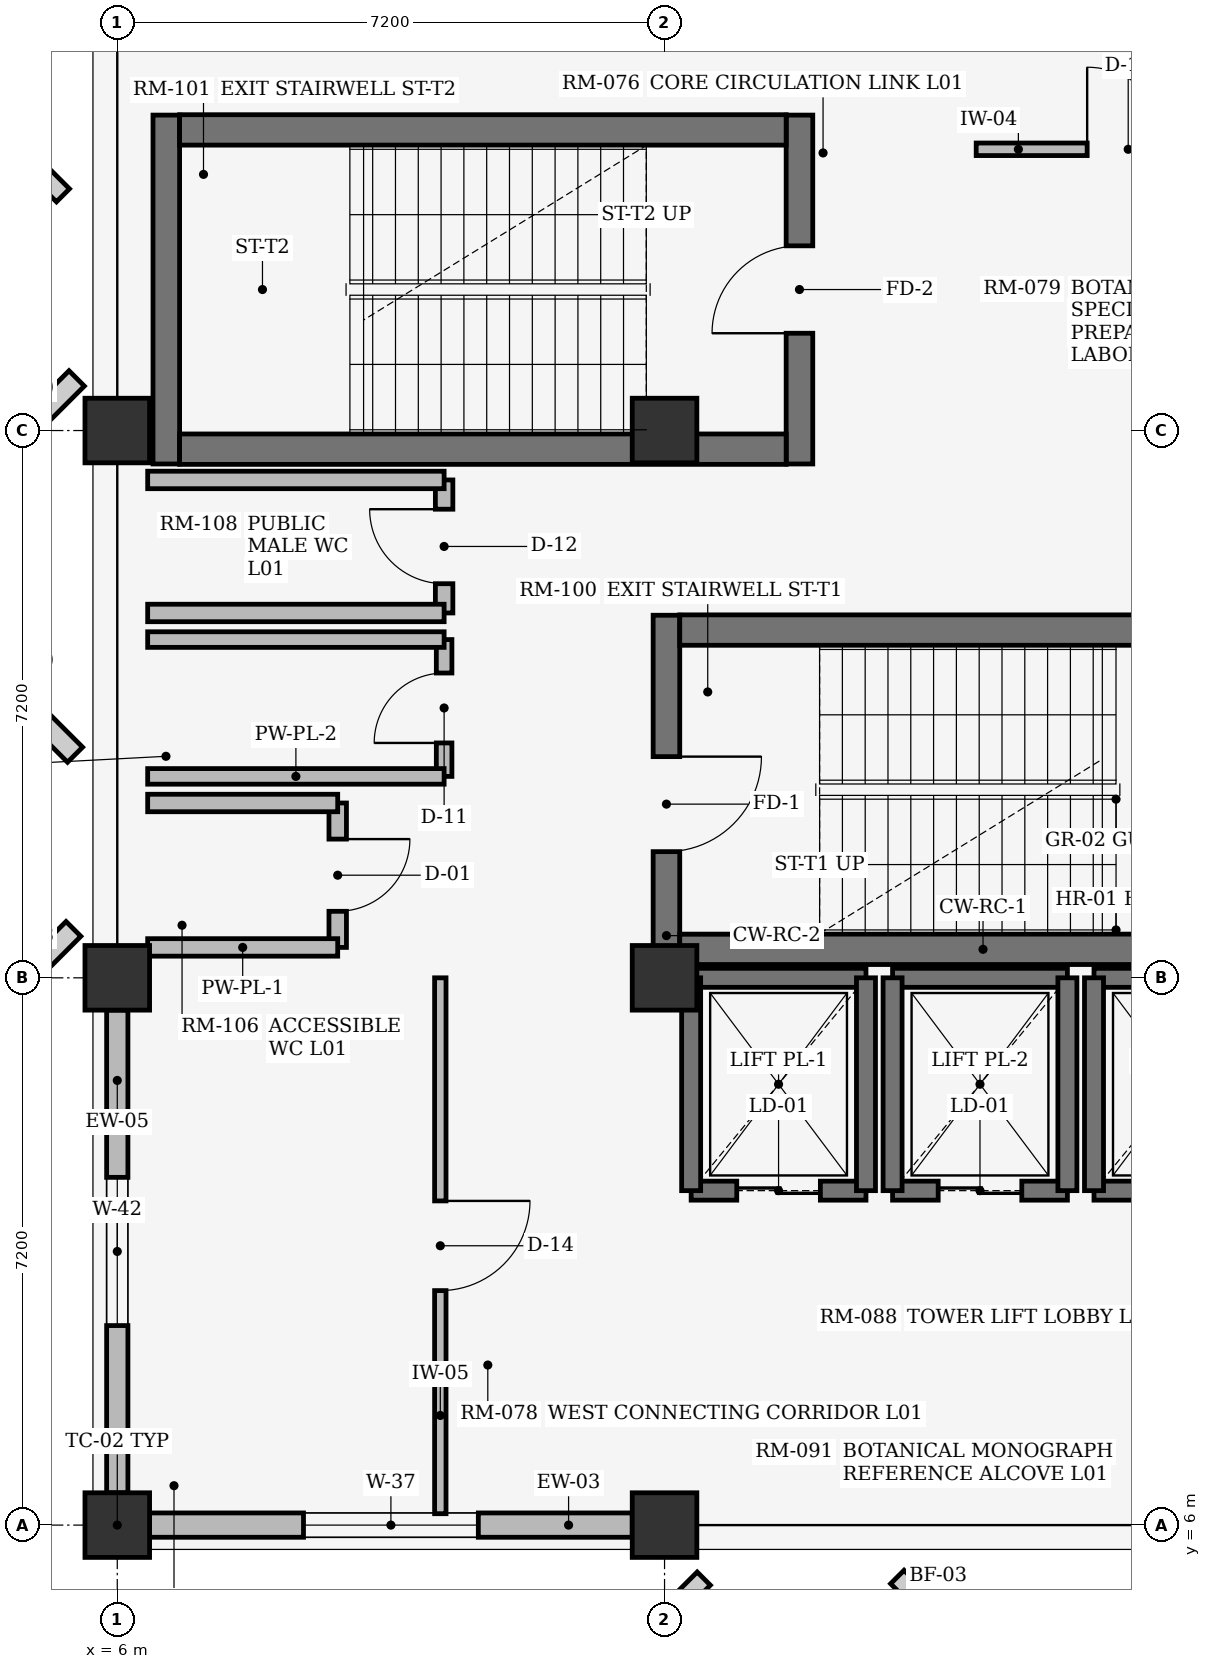
"""IFC4 building model, lengths in metres.
Left out: names, types, materials, properties, quantities, classifications, styles, units other than length and angle.
Written with IfcOpenShell. Run it as: python <this file> out.ifc"""

import sys

from ifc_helpers import new_model, si_unit, direction, frame, frame_2d, origin, origin_2d, place, context, subcontext, project, spatial, rectangle, extrude, element, fill, save


model = new_model("IFC4")
c1 = context("Model", 3, precision=1e-05, world=origin(), true_north=direction((0.0, 1.0)))
c2 = subcontext(c1, "Body", "Model", "MODEL_VIEW")
j1 = project(units=[si_unit("LENGTHUNIT", "METRE"), si_unit("PLANEANGLEUNIT", "RADIAN")], contexts=[c1])
p1 = place(None, origin())
s1 = spatial("IfcSite", under=j1, at=p1, CompositionType="ELEMENT")
p2 = place(p1, origin())
s2 = spatial("IfcBuilding", under=s1, at=p2, CompositionType="ELEMENT")
p3 = place(p2, frame((0.0, 0.0, 4.8)))
s3 = spatial("IfcBuildingStorey", under=s2, at=p3, CompositionType="ELEMENT", Elevation=4.8)
for number, where, z_axis, x_axis in (
    (1, (6.0, 6.0, 0.0), (0.0, 0.0, 1.0), (1.0, 0.0, 0.0)),
    (2, (6.0, 13.2, 0.0), (0.0, 0.0, 1.0), (1.0, 0.0, 0.0)),
    (3, (6.0, 20.4, 0.0), (0.0, 0.0, 1.0), (1.0, 0.0, 0.0)),
    (4, (13.2, 6.0, 0.0), (0.0, 0.0, 1.0), (1.0, 0.0, 0.0)),
    (5, (13.2, 13.2, 0.0), (0.0, 0.0, 1.0), (1.0, 0.0, 0.0)),
    (6, (13.2, 20.4, 0.0), (0.0, 0.0, 1.0), (1.0, 0.0, 0.0)),
):
    element("IfcColumn", number, at=place(p3, frame(where, z_axis=z_axis, x_axis=x_axis)), inside=s3, PredefinedType="COLUMN", context=c2, shape_type="SweptSolid", body=[
        extrude(rectangle(XDim=0.85, YDim=0.85, at=origin_2d()), origin(), (0.0, 0.0, 1.0), 3.95),
    ])
p4 = place(p3, frame((6.425, 6.0, 0.0), z_axis=(0.0, 0.0, 1.0), x_axis=(1.0, 0.0, 0.0)))
e7 = element("IfcWall", 7, at=p4, inside=s3, PredefinedType="STANDARD", context=c2, shape_type="SweptSolid", body=[
    extrude(rectangle(XDim=6.35, YDim=0.32, at=frame_2d((3.175, 0.0))), origin(), (0.0, 0.0, 1.0), 3.33),
])
p5 = place(p4, frame((2.025, 0.0, 0.75)))
e8 = element("IfcOpeningElement", 8, at=p5, cuts=e7, PredefinedType="OPENING", context=c2, shape_type="SweptSolid", body=[
    extrude(rectangle(XDim=2.3, YDim=1.35, at=frame_2d((1.15, 0.675))), frame((0.0, 0.17, 0.0), z_axis=(0.0, -1.0, 0.0), x_axis=(1.0, 0.0, 0.0)), (0.0, 0.0, 1.0), 0.34),
])
p6 = place(p3, frame((6.0, 6.425, 0.0), z_axis=(0.0, 0.0, 1.0), x_axis=(0.0, 1.0, 0.0)))
e9 = element("IfcWall", 9, at=p6, inside=s3, PredefinedType="STANDARD", context=c2, shape_type="SweptSolid", body=[
    extrude(rectangle(XDim=6.35, YDim=0.28, at=frame_2d((3.175, 0.0))), origin(), (0.0, 0.0, 1.0), 3.33),
])
p7 = place(p6, frame((2.2, 0.0, 0.75)))
e10 = element("IfcOpeningElement", 10, at=p7, cuts=e9, PredefinedType="OPENING", context=c2, shape_type="SweptSolid", body=[
    extrude(rectangle(XDim=1.95, YDim=1.5, at=frame_2d((0.975, 0.75))), frame((0.0, 0.15, 0.0), z_axis=(0.0, -1.0, 0.0), x_axis=(1.0, 0.0, 0.0)), (0.0, 0.0, 1.0), 0.3),
])
p8 = place(p3, frame((13.225, 13.0, 0.0), z_axis=(0.0, 0.0, 1.0), x_axis=(0.0, 1.0, 0.0)))
e11 = element("IfcWall", 11, at=p8, inside=s3, PredefinedType="SHEAR", context=c2, shape_type="SweptSolid", body=[
    extrude(rectangle(XDim=4.97, YDim=0.35, at=frame_2d((2.485, 0.0))), origin(), (0.0, 0.0, 1.0), 3.95),
])
p9 = place(p8, frame((1.86, 0.0, 0.0)))
e12 = element("IfcOpeningElement", 12, at=p9, cuts=e11, PredefinedType="OPENING", context=c2, shape_type="SweptSolid", body=[
    extrude(rectangle(XDim=1.25, YDim=2.2, at=frame_2d((0.625, 1.1))), frame((0.0, 0.185, 0.0), z_axis=(0.0, -1.0, 0.0), x_axis=(1.0, 0.0, 0.0)), (0.0, 0.0, 1.0), 0.37),
])
for number, where, z_axis, x_axis in (
    (13, (13.4, 13.575, 0.0), (0.0, 0.0, 1.0), (1.0, 0.0, 0.0)),
    (14, (13.4, 17.775, 0.0), (0.0, 0.0, 1.0), (1.0, 0.0, 0.0)),
):
    element("IfcWall", number, at=place(p3, frame(where, z_axis=z_axis, x_axis=x_axis)), inside=s3, PredefinedType="SHEAR", context=c2, shape_type="SweptSolid", body=[
        extrude(rectangle(XDim=7.98, YDim=0.4, at=frame_2d((3.99, 0.0))), origin(), (0.0, 0.0, 1.0), 3.95),
    ])
p10 = place(p3, frame((14.975, 24.55, 0.0), z_axis=(0.0, 0.0, 1.0), x_axis=(0.0, -1.0, 0.0)))
e15 = element("IfcWall", 15, at=p10, inside=s3, PredefinedType="SHEAR", context=c2, shape_type="SweptSolid", body=[
    extrude(rectangle(XDim=4.59, YDim=0.35, at=frame_2d((2.295, 0.0))), origin(), (0.0, 0.0, 1.0), 3.95),
])
p11 = place(p10, frame((1.72, 0.0, 0.0)))
e16 = element("IfcOpeningElement", 16, at=p11, cuts=e15, PredefinedType="OPENING", context=c2, shape_type="SweptSolid", body=[
    extrude(rectangle(XDim=1.15, YDim=2.2, at=frame_2d((0.575, 1.1))), frame((0.0, 0.185, 0.0), z_axis=(0.0, -1.0, 0.0), x_axis=(1.0, 0.0, 0.0)), (0.0, 0.0, 1.0), 0.37),
])
p12 = place(p3, frame((6.645, 24.55, 0.0), z_axis=(0.0, 0.0, 1.0), x_axis=(0.0, -1.0, 0.0)))
e17 = element("IfcWall", 17, at=p12, inside=s3, PredefinedType="SHEAR", context=c2, shape_type="SweptSolid", body=[
    extrude(rectangle(XDim=4.59, YDim=0.35, at=frame_2d((2.295, 0.0))), origin(), (0.0, 0.0, 1.0), 3.95),
])
for number, where, z_axis, x_axis in (
    (18, (14.8, 24.355, 0.0), (0.0, 0.0, 1.0), (-1.0, 0.0, 0.0)),
    (19, (14.8, 20.155, 0.0), (0.0, 0.0, 1.0), (-1.0, 0.0, 0.0)),
):
    element("IfcWall", number, at=place(p3, frame(where, z_axis=z_axis, x_axis=x_axis)), inside=s3, PredefinedType="SHEAR", context=c2, shape_type="SweptSolid", body=[
        extrude(rectangle(XDim=7.98, YDim=0.4, at=frame_2d((3.99, 0.0))), origin(), (0.0, 0.0, 1.0), 3.95),
    ])
p13 = place(p3, frame((13.55, 10.4, 0.0), z_axis=(0.0, 0.0, 1.0), x_axis=(1.0, 0.0, 0.0)))
e20 = element("IfcWall", 20, at=p13, inside=s3, PredefinedType="SHEAR", context=c2, shape_type="SweptSolid", body=[
    extrude(rectangle(XDim=2.3, YDim=0.25, at=frame_2d((1.15, 0.0))), origin(), (0.0, 0.0, 1.0), 3.95),
])
p14 = place(p13, frame((0.6, 0.0, 0.0)))
e21 = element("IfcOpeningElement", 21, at=p14, cuts=e20, PredefinedType="OPENING", context=c2, shape_type="SweptSolid", body=[
    extrude(rectangle(XDim=1.1, YDim=2.2, at=frame_2d((0.55, 1.1))), frame((0.0, 0.135, 0.0), z_axis=(0.0, -1.0, 0.0), x_axis=(1.0, 0.0, 0.0)), (0.0, 0.0, 1.0), 0.27),
])
p15 = place(p3, frame((13.55, 13.2, 0.0), z_axis=(0.0, 0.0, 1.0), x_axis=(1.0, 0.0, 0.0)))
e22 = element("IfcWall", 22, at=p15, inside=s3, PredefinedType="SHEAR", context=c2, shape_type="SweptSolid", body=[
    extrude(rectangle(XDim=2.3, YDim=0.25, at=frame_2d((1.15, 0.0))), origin(), (0.0, 0.0, 1.0), 3.95),
])
for number, where, z_axis, x_axis in (
    (23, (13.55, 10.4, 0.0), (0.0, 0.0, 1.0), (0.0, 1.0, 0.0)),
    (24, (15.85, 10.4, 0.0), (0.0, 0.0, 1.0), (0.0, 1.0, 0.0)),
):
    element("IfcWall", number, at=place(p3, frame(where, z_axis=z_axis, x_axis=x_axis)), inside=s3, PredefinedType="SHEAR", context=c2, shape_type="SweptSolid", body=[
        extrude(rectangle(XDim=2.8, YDim=0.25, at=frame_2d((1.4, 0.0))), origin(), (0.0, 0.0, 1.0), 3.95),
    ])
p16 = place(p3, frame((16.2, 10.4, 0.0), z_axis=(0.0, 0.0, 1.0), x_axis=(1.0, 0.0, 0.0)))
e25 = element("IfcWall", 25, at=p16, inside=s3, PredefinedType="SHEAR", context=c2, shape_type="SweptSolid", body=[
    extrude(rectangle(XDim=2.3, YDim=0.25, at=frame_2d((1.15, 0.0))), origin(), (0.0, 0.0, 1.0), 3.95),
])
p17 = place(p16, frame((0.6, 0.0, 0.0)))
e26 = element("IfcOpeningElement", 26, at=p17, cuts=e25, PredefinedType="OPENING", context=c2, shape_type="SweptSolid", body=[
    extrude(rectangle(XDim=1.1, YDim=2.2, at=frame_2d((0.55, 1.1))), frame((0.0, 0.135, 0.0), z_axis=(0.0, -1.0, 0.0), x_axis=(1.0, 0.0, 0.0)), (0.0, 0.0, 1.0), 0.27),
])
p18 = place(p3, frame((16.2, 13.2, 0.0), z_axis=(0.0, 0.0, 1.0), x_axis=(1.0, 0.0, 0.0)))
e27 = element("IfcWall", 27, at=p18, inside=s3, PredefinedType="SHEAR", context=c2, shape_type="SweptSolid", body=[
    extrude(rectangle(XDim=2.3, YDim=0.25, at=frame_2d((1.15, 0.0))), origin(), (0.0, 0.0, 1.0), 3.95),
])
for number, where, z_axis, x_axis in (
    (28, (16.2, 10.4, 0.0), (0.0, 0.0, 1.0), (0.0, 1.0, 0.0)),
    (29, (18.5, 10.4, 0.0), (0.0, 0.0, 1.0), (0.0, 1.0, 0.0)),
):
    element("IfcWall", number, at=place(p3, frame(where, z_axis=z_axis, x_axis=x_axis)), inside=s3, PredefinedType="SHEAR", context=c2, shape_type="SweptSolid", body=[
        extrude(rectangle(XDim=2.8, YDim=0.25, at=frame_2d((1.4, 0.0))), origin(), (0.0, 0.0, 1.0), 3.95),
    ])
p19 = place(p3, frame((18.85, 10.4, 0.0), z_axis=(0.0, 0.0, 1.0), x_axis=(1.0, 0.0, 0.0)))
e30 = element("IfcWall", 30, at=p19, inside=s3, PredefinedType="SHEAR", context=c2, shape_type="SweptSolid", body=[
    extrude(rectangle(XDim=2.3, YDim=0.25, at=frame_2d((1.15, 0.0))), origin(), (0.0, 0.0, 1.0), 3.95),
])
p20 = place(p19, frame((0.6, 0.0, 0.0)))
e31 = element("IfcOpeningElement", 31, at=p20, cuts=e30, PredefinedType="OPENING", context=c2, shape_type="SweptSolid", body=[
    extrude(rectangle(XDim=1.1, YDim=2.2, at=frame_2d((0.55, 1.1))), frame((0.0, 0.135, 0.0), z_axis=(0.0, -1.0, 0.0), x_axis=(1.0, 0.0, 0.0)), (0.0, 0.0, 1.0), 0.27),
])
p21 = place(p3, frame((18.85, 13.2, 0.0), z_axis=(0.0, 0.0, 1.0), x_axis=(1.0, 0.0, 0.0)))
e32 = element("IfcWall", 32, at=p21, inside=s3, PredefinedType="SHEAR", context=c2, shape_type="SweptSolid", body=[
    extrude(rectangle(XDim=2.3, YDim=0.25, at=frame_2d((1.15, 0.0))), origin(), (0.0, 0.0, 1.0), 3.95),
])
p22 = place(p3, frame((18.85, 10.4, 0.0), z_axis=(0.0, 0.0, 1.0), x_axis=(0.0, 1.0, 0.0)))
e33 = element("IfcWall", 33, at=p22, inside=s3, PredefinedType="SHEAR", context=c2, shape_type="SweptSolid", body=[
    extrude(rectangle(XDim=2.8, YDim=0.25, at=frame_2d((1.4, 0.0))), origin(), (0.0, 0.0, 1.0), 3.95),
])
p23 = place(p3, frame((8.9, 13.6, 0.0), z_axis=(0.0, 0.0, 1.0), x_axis=(0.0, 1.0, 0.0)))
e34 = element("IfcWall", 34, at=p23, inside=s3, PredefinedType="PLUMBINGWALL", context=c2, shape_type="SweptSolid", body=[
    extrude(rectangle(XDim=1.9, YDim=0.23, at=frame_2d((0.95, 0.0))), origin(), (0.0, 0.0, 1.0), 3.93),
])
p24 = place(p23, frame((0.475, 0.0, 0.0)))
e35 = element("IfcOpeningElement", 35, at=p24, cuts=e34, PredefinedType="OPENING", context=c2, shape_type="SweptSolid", body=[
    extrude(rectangle(XDim=0.95, YDim=2.15, at=frame_2d((0.475, 1.075))), frame((0.0, 0.125, 0.0), z_axis=(0.0, -1.0, 0.0), x_axis=(1.0, 0.0, 0.0)), (0.0, 0.0, 1.0), 0.25),
])
for number, where, z_axis, x_axis in (
    (36, (6.4, 13.6, 0.0), (0.0, 0.0, 1.0), (1.0, 0.0, 0.0)),
    (37, (6.4, 15.5, 0.0), (0.0, 0.0, 1.0), (1.0, 0.0, 0.0)),
):
    element("IfcWall", number, at=place(p3, frame(where, z_axis=z_axis, x_axis=x_axis)), inside=s3, PredefinedType="PLUMBINGWALL", context=c2, shape_type="SweptSolid", body=[
        extrude(rectangle(XDim=2.5, YDim=0.23, at=frame_2d((1.25, 0.0))), origin(), (0.0, 0.0, 1.0), 3.93),
    ])
p25 = place(p3, frame((10.3, 15.85, 0.0), z_axis=(0.0, 0.0, 1.0), x_axis=(0.0, 1.0, 0.0)))
e38 = element("IfcWall", 38, at=p25, inside=s3, PredefinedType="PLUMBINGWALL", context=c2, shape_type="SweptSolid", body=[
    extrude(rectangle(XDim=1.8, YDim=0.205, at=frame_2d((0.9, 0.0))), origin(), (0.0, 0.0, 1.0), 3.93),
])
p26 = place(p25, frame((0.44, 0.0, 0.0)))
e39 = element("IfcOpeningElement", 39, at=p26, cuts=e38, PredefinedType="OPENING", context=c2, shape_type="SweptSolid", body=[
    extrude(rectangle(XDim=0.92, YDim=2.1, at=frame_2d((0.46, 1.05))), frame((0.0, 0.113, 0.0), z_axis=(0.0, -1.0, 0.0), x_axis=(1.0, 0.0, 0.0)), (0.0, 0.0, 1.0), 0.225),
])
for number, where, z_axis, x_axis in (
    (40, (6.4, 15.85, 0.0), (0.0, 0.0, 1.0), (1.0, 0.0, 0.0)),
    (41, (6.4, 17.65, 0.0), (0.0, 0.0, 1.0), (1.0, 0.0, 0.0)),
):
    element("IfcWall", number, at=place(p3, frame(where, z_axis=z_axis, x_axis=x_axis)), inside=s3, PredefinedType="PLUMBINGWALL", context=c2, shape_type="SweptSolid", body=[
        extrude(rectangle(XDim=3.9, YDim=0.205, at=frame_2d((1.95, 0.0))), origin(), (0.0, 0.0, 1.0), 3.93),
    ])
p27 = place(p3, frame((10.3, 18.0, 0.0), z_axis=(0.0, 0.0, 1.0), x_axis=(0.0, 1.0, 0.0)))
e42 = element("IfcWall", 42, at=p27, inside=s3, PredefinedType="PLUMBINGWALL", context=c2, shape_type="SweptSolid", body=[
    extrude(rectangle(XDim=1.75, YDim=0.23, at=frame_2d((0.875, 0.0))), origin(), (0.0, 0.0, 1.0), 3.93),
])
p28 = place(p27, frame((0.385, 0.0, 0.0)))
e43 = element("IfcOpeningElement", 43, at=p28, cuts=e42, PredefinedType="OPENING", context=c2, shape_type="SweptSolid", body=[
    extrude(rectangle(XDim=0.98, YDim=2.1, at=frame_2d((0.49, 1.05))), frame((0.0, 0.125, 0.0), z_axis=(0.0, -1.0, 0.0), x_axis=(1.0, 0.0, 0.0)), (0.0, 0.0, 1.0), 0.25),
])
for number, where, z_axis, x_axis in (
    (44, (6.4, 18.0, 0.0), (0.0, 0.0, 1.0), (1.0, 0.0, 0.0)),
    (45, (6.4, 19.75, 0.0), (0.0, 0.0, 1.0), (1.0, 0.0, 0.0)),
):
    element("IfcWall", number, at=place(p3, frame(where, z_axis=z_axis, x_axis=x_axis)), inside=s3, PredefinedType="PLUMBINGWALL", context=c2, shape_type="SweptSolid", body=[
        extrude(rectangle(XDim=3.9, YDim=0.23, at=frame_2d((1.95, 0.0))), origin(), (0.0, 0.0, 1.0), 3.93),
    ])
p29 = place(p3, frame((17.3, 24.1, 0.0), z_axis=(0.0, 0.0, 1.0), x_axis=(1.0, 0.0, 0.0)))
e46 = element("IfcWall", 46, at=p29, inside=s3, PredefinedType="PARTITIONING", context=c2, shape_type="SweptSolid", body=[
    extrude(rectangle(XDim=4.0, YDim=0.165, at=frame_2d((2.0, 0.0))), origin(), (0.0, 0.0, 1.0), 3.93),
])
p30 = place(p29, frame((1.46, 0.0, 0.0)))
e47 = element("IfcOpeningElement", 47, at=p30, cuts=e46, PredefinedType="OPENING", context=c2, shape_type="SweptSolid", body=[
    extrude(rectangle(XDim=1.08, YDim=2.1, at=frame_2d((0.54, 1.05))), frame((0.0, 0.093, 0.0), z_axis=(0.0, -1.0, 0.0), x_axis=(1.0, 0.0, 0.0)), (0.0, 0.0, 1.0), 0.185),
])
p31 = place(p3, frame((10.25, 6.15, 0.0), z_axis=(0.0, 0.0, 1.0), x_axis=(0.0, 1.0, 0.0)))
e48 = element("IfcWall", 48, at=p31, inside=s3, PredefinedType="PARTITIONING", context=c2, shape_type="SweptSolid", body=[
    extrude(rectangle(XDim=7.05, YDim=0.15, at=frame_2d((3.525, 0.0))), origin(), (0.0, 0.0, 1.0), 3.93),
])
p32 = place(p31, frame((2.935, 0.0, 0.0)))
e49 = element("IfcOpeningElement", 49, at=p32, cuts=e48, PredefinedType="OPENING", context=c2, shape_type="SweptSolid", body=[
    extrude(rectangle(XDim=1.18, YDim=2.1, at=frame_2d((0.59, 1.05))), frame((0.0, 0.085, 0.0), z_axis=(0.0, -1.0, 0.0), x_axis=(1.0, 0.0, 0.0)), (0.0, 0.0, 1.0), 0.17),
])
p33 = place(p5, origin())
e50 = element("IfcWindow", 50, at=p33, inside=s3, PartitioningType="SINGLE_PANEL", PredefinedType="WINDOW", context=c2, shape_type="SweptSolid", body=[
    extrude(rectangle(XDim=2.3, YDim=1.35, at=frame_2d((1.15, 0.675))), frame((0.0, 0.03, 0.0), z_axis=(0.0, -1.0, 0.0), x_axis=(1.0, 0.0, 0.0)), (0.0, 0.0, 1.0), 0.06),
])
fill(e8, e50)
p34 = place(p7, origin())
e51 = element("IfcWindow", 51, at=p34, inside=s3, PartitioningType="SINGLE_PANEL", PredefinedType="WINDOW", context=c2, shape_type="SweptSolid", body=[
    extrude(rectangle(XDim=1.95, YDim=1.5, at=frame_2d((0.975, 0.75))), frame((0.0, 0.03, 0.0), z_axis=(0.0, -1.0, 0.0), x_axis=(1.0, 0.0, 0.0)), (0.0, 0.0, 1.0), 0.06),
])
fill(e10, e51)
p35 = place(p9, origin())
e52 = element("IfcDoor", 52, at=p35, inside=s3, OperationType="SINGLE_SWING_RIGHT", PredefinedType="DOOR", context=c2, shape_type="SweptSolid", body=[
    extrude(rectangle(XDim=1.25, YDim=2.2, at=frame_2d((0.625, 1.1))), frame((0.0, 0.025, 0.0), z_axis=(0.0, -1.0, 0.0), x_axis=(1.0, 0.0, 0.0)), (0.0, 0.0, 1.0), 0.05),
])
fill(e12, e52)
p36 = place(p11, origin())
e53 = element("IfcDoor", 53, at=p36, inside=s3, OperationType="SINGLE_SWING_RIGHT", PredefinedType="DOOR", context=c2, shape_type="SweptSolid", body=[
    extrude(rectangle(XDim=1.15, YDim=2.2, at=frame_2d((0.575, 1.1))), frame((0.0, 0.025, 0.0), z_axis=(0.0, -1.0, 0.0), x_axis=(1.0, 0.0, 0.0)), (0.0, 0.0, 1.0), 0.05),
])
fill(e16, e53)
p37 = place(p14, origin())
e54 = element("IfcDoor", 54, at=p37, inside=s3, OperationType="DOUBLE_DOOR_SLIDING", PredefinedType="DOOR", context=c2, shape_type="SweptSolid", body=[
    extrude(rectangle(XDim=1.1, YDim=2.2, at=frame_2d((0.55, 1.1))), frame((0.0, 0.025, 0.0), z_axis=(0.0, -1.0, 0.0), x_axis=(1.0, 0.0, 0.0)), (0.0, 0.0, 1.0), 0.05),
])
fill(e21, e54)
p38 = place(p17, origin())
e55 = element("IfcDoor", 55, at=p38, inside=s3, OperationType="DOUBLE_DOOR_SLIDING", PredefinedType="DOOR", context=c2, shape_type="SweptSolid", body=[
    extrude(rectangle(XDim=1.1, YDim=2.2, at=frame_2d((0.55, 1.1))), frame((0.0, 0.025, 0.0), z_axis=(0.0, -1.0, 0.0), x_axis=(1.0, 0.0, 0.0)), (0.0, 0.0, 1.0), 0.05),
])
fill(e26, e55)
p39 = place(p24, origin())
e56 = element("IfcDoor", 56, at=p39, inside=s3, OperationType="SINGLE_SWING_RIGHT", PredefinedType="DOOR", context=c2, shape_type="SweptSolid", body=[
    extrude(rectangle(XDim=0.95, YDim=2.15, at=frame_2d((0.475, 1.075))), frame((0.0, 0.025, 0.0), z_axis=(0.0, -1.0, 0.0), x_axis=(1.0, 0.0, 0.0)), (0.0, 0.0, 1.0), 0.05),
])
fill(e35, e56)
p40 = place(p26, origin())
e57 = element("IfcDoor", 57, at=p40, inside=s3, OperationType="SINGLE_SWING_LEFT", PredefinedType="DOOR", context=c2, shape_type="SweptSolid", body=[
    extrude(rectangle(XDim=0.92, YDim=2.1, at=frame_2d((0.46, 1.05))), frame((0.0, 0.025, 0.0), z_axis=(0.0, -1.0, 0.0), x_axis=(1.0, 0.0, 0.0)), (0.0, 0.0, 1.0), 0.05),
])
fill(e39, e57)
p41 = place(p28, frame((0.98, 0.0, 0.0), z_axis=(0.0, 0.0, 1.0), x_axis=(-1.0, 0.0, 0.0)))
e58 = element("IfcDoor", 58, at=p41, inside=s3, OperationType="SINGLE_SWING_RIGHT", PredefinedType="DOOR", context=c2, shape_type="SweptSolid", body=[
    extrude(rectangle(XDim=0.98, YDim=2.1, at=frame_2d((0.49, 1.05))), frame((0.0, 0.025, 0.0), z_axis=(0.0, -1.0, 0.0), x_axis=(1.0, 0.0, 0.0)), (0.0, 0.0, 1.0), 0.05),
])
fill(e43, e58)
p42 = place(p30, origin())
e59 = element("IfcDoor", 59, at=p42, inside=s3, OperationType="SINGLE_SWING_LEFT", PredefinedType="DOOR", context=c2, shape_type="SweptSolid", body=[
    extrude(rectangle(XDim=1.08, YDim=2.1, at=frame_2d((0.54, 1.05))), frame((0.0, 0.025, 0.0), z_axis=(0.0, -1.0, 0.0), x_axis=(1.0, 0.0, 0.0)), (0.0, 0.0, 1.0), 0.05),
])
fill(e47, e59)
p43 = place(p32, origin())
e60 = element("IfcDoor", 60, at=p43, inside=s3, OperationType="SINGLE_SWING_RIGHT", PredefinedType="DOOR", context=c2, shape_type="SweptSolid", body=[
    extrude(rectangle(XDim=1.18, YDim=2.1, at=frame_2d((0.59, 1.05))), frame((0.0, 0.025, 0.0), z_axis=(0.0, -1.0, 0.0), x_axis=(1.0, 0.0, 0.0)), (0.0, 0.0, 1.0), 0.05),
])
fill(e49, e60)
save(model, sys.argv[1])
